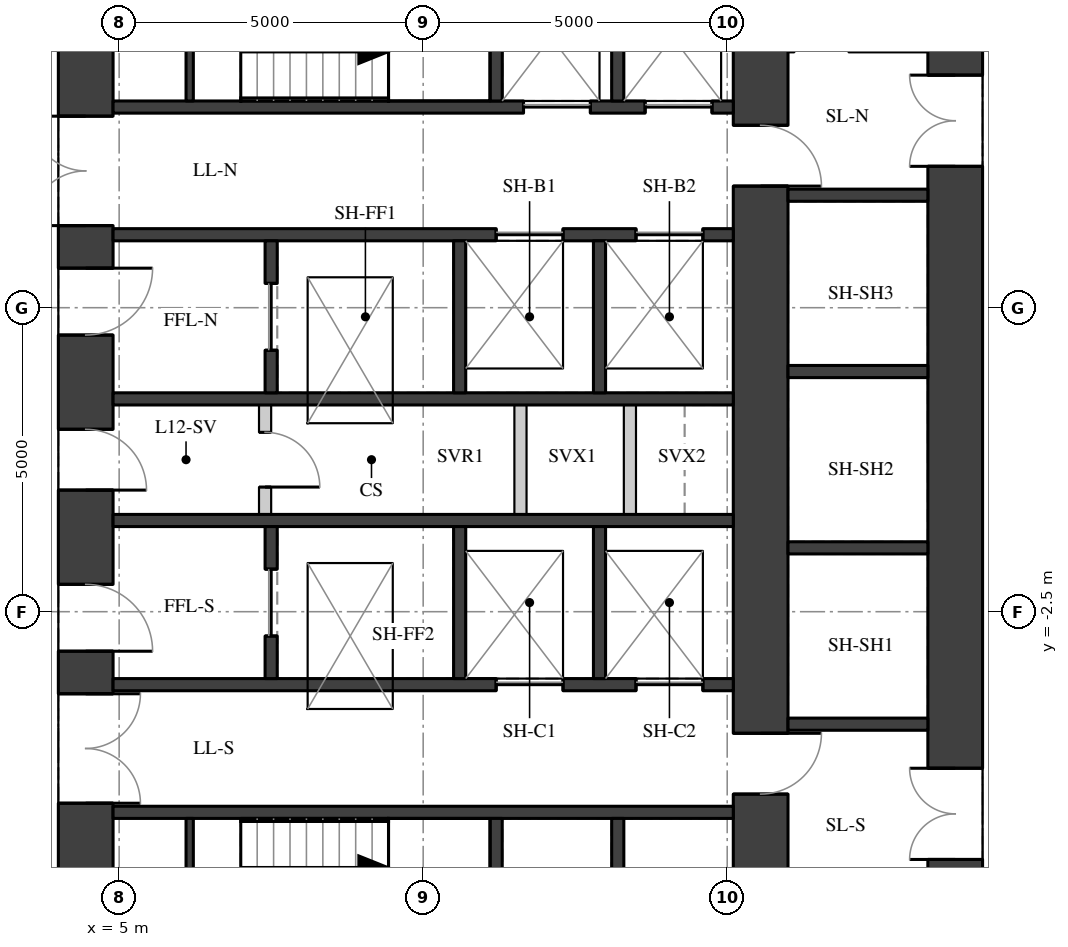
"""IFC4 building model, lengths in metres.
Left out: names, types, materials, properties, quantities, classifications, styles, units other than length and angle.
Written with IfcOpenShell. Run it as: python <this file> out.ifc"""

import sys

from ifc_helpers import new_model, si_unit, direction, frame, frame_2d, origin, place, context, subcontext, project, spatial, rectangle, extrude, element, fill, save


model = new_model("IFC4")
c1 = context("Model", 3, precision=1e-05, world=origin(), true_north=direction((0.0, 1.0)))
c2 = subcontext(c1, "Body", "Model", "MODEL_VIEW")
j1 = project(units=[si_unit("LENGTHUNIT", "METRE"), si_unit("PLANEANGLEUNIT", "RADIAN")], contexts=[c1])
p1 = place(None, origin())
s1 = spatial("IfcSite", under=j1, at=p1, CompositionType="ELEMENT")
p2 = place(p1, origin())
s2 = spatial("IfcBuilding", under=s1, at=p2, CompositionType="ELEMENT")
p3 = place(p2, frame((0.0, 0.0, 48.1)))
s3 = spatial("IfcBuildingStorey", under=s2, at=p3, CompositionType="ELEMENT", Elevation=48.1)
p4 = place(p3, frame((4.45, -11.1, 0.0), z_axis=(0.0, 0.0, 1.0), x_axis=(0.0, 1.0, 0.0)))
e1 = element("IfcWall", 1, at=p4, inside=s3, PredefinedType="SHEAR", context=c2, shape_type="SweptSolid", body=[
    extrude(rectangle(XDim=22.2, YDim=0.9, at=frame_2d((11.1, 0.0))), origin(), (0.0, 0.0, 1.0), 3.02),
])
p5 = place(p4, frame((2.35, 0.0, 0.0)))
e2 = element("IfcOpeningElement", 2, at=p5, cuts=e1, PredefinedType="OPENING", context=c2, shape_type="SweptSolid", body=[
    extrude(rectangle(XDim=1.5, YDim=2.1, at=frame_2d((0.75, 1.05))), frame((0.0, 0.46, 0.0), z_axis=(0.0, -1.0, 0.0), x_axis=(1.0, 0.0, 0.0)), (0.0, 0.0, 1.0), 0.92),
])
p6 = place(p4, frame((5.45, 0.0, 0.0)))
e3 = element("IfcOpeningElement", 3, at=p6, cuts=e1, PredefinedType="OPENING", context=c2, shape_type="SweptSolid", body=[
    extrude(rectangle(XDim=1.8, YDim=2.1, at=frame_2d((0.9, 1.05))), frame((0.0, 0.46, 0.0), z_axis=(0.0, -1.0, 0.0), x_axis=(1.0, 0.0, 0.0)), (0.0, 0.0, 1.0), 0.92),
])
p7 = place(p4, frame((7.95, 0.0, 0.0)))
e4 = element("IfcOpeningElement", 4, at=p7, cuts=e1, PredefinedType="OPENING", context=c2, shape_type="SweptSolid", body=[
    extrude(rectangle(XDim=1.1, YDim=2.1, at=frame_2d((0.55, 1.05))), frame((0.0, 0.46, 0.0), z_axis=(0.0, -1.0, 0.0), x_axis=(1.0, 0.0, 0.0)), (0.0, 0.0, 1.0), 0.92),
])
p8 = place(p4, frame((10.6, 0.0, 0.0)))
e5 = element("IfcOpeningElement", 5, at=p8, cuts=e1, PredefinedType="OPENING", context=c2, shape_type="SweptSolid", body=[
    extrude(rectangle(XDim=1.0, YDim=2.1, at=frame_2d((0.5, 1.05))), frame((0.0, 0.46, 0.0), z_axis=(0.0, -1.0, 0.0), x_axis=(1.0, 0.0, 0.0)), (0.0, 0.0, 1.0), 0.92),
])
p9 = place(p4, frame((13.15, 0.0, 0.0)))
e6 = element("IfcOpeningElement", 6, at=p9, cuts=e1, PredefinedType="OPENING", context=c2, shape_type="SweptSolid", body=[
    extrude(rectangle(XDim=1.1, YDim=2.1, at=frame_2d((0.55, 1.05))), frame((0.0, 0.46, 0.0), z_axis=(0.0, -1.0, 0.0), x_axis=(1.0, 0.0, 0.0)), (0.0, 0.0, 1.0), 0.92),
])
p10 = place(p4, frame((14.95, 0.0, 0.0)))
e7 = element("IfcOpeningElement", 7, at=p10, cuts=e1, PredefinedType="OPENING", context=c2, shape_type="SweptSolid", body=[
    extrude(rectangle(XDim=1.8, YDim=2.1, at=frame_2d((0.9, 1.05))), frame((0.0, 0.46, 0.0), z_axis=(0.0, -1.0, 0.0), x_axis=(1.0, 0.0, 0.0)), (0.0, 0.0, 1.0), 0.92),
])
p11 = place(p4, frame((18.35, 0.0, 0.0)))
e8 = element("IfcOpeningElement", 8, at=p11, cuts=e1, PredefinedType="OPENING", context=c2, shape_type="SweptSolid", body=[
    extrude(rectangle(XDim=1.5, YDim=2.1, at=frame_2d((0.75, 1.05))), frame((0.0, 0.46, 0.0), z_axis=(0.0, -1.0, 0.0), x_axis=(1.0, 0.0, 0.0)), (0.0, 0.0, 1.0), 0.92),
])
p12 = place(p3, frame((18.75, -11.1, 0.0), z_axis=(0.0, 0.0, 1.0), x_axis=(0.0, 1.0, 0.0)))
e9 = element("IfcWall", 9, at=p12, inside=s3, PredefinedType="SHEAR", context=c2, shape_type="SweptSolid", body=[
    extrude(rectangle(XDim=22.2, YDim=0.9, at=frame_2d((11.1, 0.0))), origin(), (0.0, 0.0, 1.0), 3.02),
])
p13 = place(p12, frame((15.925, 0.0, 0.0)))
e10 = element("IfcOpeningElement", 10, at=p13, cuts=e9, PredefinedType="OPENING", context=c2, shape_type="SweptSolid", body=[
    extrude(rectangle(XDim=1.5, YDim=2.1, at=frame_2d((0.75, 1.05))), frame((0.0, 0.46, 0.0), z_axis=(0.0, -1.0, 0.0), x_axis=(1.0, 0.0, 0.0)), (0.0, 0.0, 1.0), 0.92),
])
p14 = place(p12, frame((4.525, 0.0, 0.0)))
e11 = element("IfcOpeningElement", 11, at=p14, cuts=e9, PredefinedType="OPENING", context=c2, shape_type="SweptSolid", body=[
    extrude(rectangle(XDim=1.5, YDim=2.1, at=frame_2d((0.75, 1.05))), frame((0.0, 0.46, 0.0), z_axis=(0.0, -1.0, 0.0), x_axis=(1.0, 0.0, 0.0)), (0.0, 0.0, 1.0), 0.92),
])
p15 = place(p3, frame((15.55, -11.1, 0.0), z_axis=(0.0, 0.0, 1.0), x_axis=(0.0, 1.0, 0.0)))
e12 = element("IfcWall", 12, at=p15, inside=s3, PredefinedType="SHEAR", context=c2, shape_type="SweptSolid", body=[
    extrude(rectangle(XDim=22.2, YDim=0.9, at=frame_2d((11.1, 0.0))), origin(), (0.0, 0.0, 1.0), 3.02),
])
p16 = place(p15, frame((15.6, 0.0, 0.0)))
e13 = element("IfcOpeningElement", 13, at=p16, cuts=e12, PredefinedType="OPENING", context=c2, shape_type="SweptSolid", body=[
    extrude(rectangle(XDim=1.0, YDim=2.1, at=frame_2d((0.5, 1.05))), frame((0.0, 0.46, 0.0), z_axis=(0.0, -1.0, 0.0), x_axis=(1.0, 0.0, 0.0)), (0.0, 0.0, 1.0), 0.92),
])
p17 = place(p15, frame((5.6, 0.0, 0.0)))
e14 = element("IfcOpeningElement", 14, at=p17, cuts=e12, PredefinedType="OPENING", context=c2, shape_type="SweptSolid", body=[
    extrude(rectangle(XDim=1.0, YDim=2.1, at=frame_2d((0.5, 1.05))), frame((0.0, 0.46, 0.0), z_axis=(0.0, -1.0, 0.0), x_axis=(1.0, 0.0, 0.0)), (0.0, 0.0, 1.0), 0.92),
])
p18 = place(p3, frame((4.9, 5.8, 0.0), z_axis=(0.0, 0.0, 1.0), x_axis=(1.0, 0.0, 0.0)))
e15 = element("IfcWall", 15, at=p18, inside=s3, PredefinedType="SHEAR", context=c2, shape_type="SweptSolid", body=[
    extrude(rectangle(XDim=10.2, YDim=0.2, at=frame_2d((5.1, 0.0))), origin(), (0.0, 0.0, 1.0), 3.02),
])
p19 = place(p18, frame((6.75, 0.0, 0.0)))
e16 = element("IfcOpeningElement", 16, at=p19, cuts=e15, PredefinedType="OPENING", context=c2, shape_type="SweptSolid", body=[
    extrude(rectangle(XDim=1.1, YDim=2.1, at=frame_2d((0.55, 1.05))), frame((0.0, 0.11, 0.0), z_axis=(0.0, -1.0, 0.0), x_axis=(1.0, 0.0, 0.0)), (0.0, 0.0, 1.0), 0.22),
])
p20 = place(p18, frame((8.75, 0.0, 0.0)))
e17 = element("IfcOpeningElement", 17, at=p20, cuts=e15, PredefinedType="OPENING", context=c2, shape_type="SweptSolid", body=[
    extrude(rectangle(XDim=1.1, YDim=2.1, at=frame_2d((0.55, 1.05))), frame((0.0, 0.11, 0.0), z_axis=(0.0, -1.0, 0.0), x_axis=(1.0, 0.0, 0.0)), (0.0, 0.0, 1.0), 0.22),
])
p21 = place(p3, frame((4.9, 3.7, 0.0), z_axis=(0.0, 0.0, 1.0), x_axis=(1.0, 0.0, 0.0)))
e18 = element("IfcWall", 18, at=p21, inside=s3, PredefinedType="SHEAR", context=c2, shape_type="SweptSolid", body=[
    extrude(rectangle(XDim=10.2, YDim=0.2, at=frame_2d((5.1, 0.0))), origin(), (0.0, 0.0, 1.0), 3.02),
])
p22 = place(p21, frame((6.3, 0.0, 0.0)))
e19 = element("IfcOpeningElement", 19, at=p22, cuts=e18, PredefinedType="OPENING", context=c2, shape_type="SweptSolid", body=[
    extrude(rectangle(XDim=1.1, YDim=2.1, at=frame_2d((0.55, 1.05))), frame((0.0, 0.11, 0.0), z_axis=(0.0, -1.0, 0.0), x_axis=(1.0, 0.0, 0.0)), (0.0, 0.0, 1.0), 0.22),
])
p23 = place(p21, frame((8.6, 0.0, 0.0)))
e20 = element("IfcOpeningElement", 20, at=p23, cuts=e18, PredefinedType="OPENING", context=c2, shape_type="SweptSolid", body=[
    extrude(rectangle(XDim=1.1, YDim=2.1, at=frame_2d((0.55, 1.05))), frame((0.0, 0.11, 0.0), z_axis=(0.0, -1.0, 0.0), x_axis=(1.0, 0.0, 0.0)), (0.0, 0.0, 1.0), 0.22),
])
for number, where, z_axis, x_axis in (
    (21, (4.9, 1.0, 0.0), (0.0, 0.0, 1.0), (1.0, 0.0, 0.0)),
    (22, (4.9, -1.0, 0.0), (0.0, 0.0, 1.0), (1.0, 0.0, 0.0)),
):
    element("IfcWall", number, at=place(p3, frame(where, z_axis=z_axis, x_axis=x_axis)), inside=s3, PredefinedType="SHEAR", context=c2, shape_type="SweptSolid", body=[
        extrude(rectangle(XDim=10.2, YDim=0.2, at=frame_2d((5.1, 0.0))), origin(), (0.0, 0.0, 1.0), 3.02),
    ])
p24 = place(p3, frame((4.9, -3.7, 0.0), z_axis=(0.0, 0.0, 1.0), x_axis=(1.0, 0.0, 0.0)))
e23 = element("IfcWall", 23, at=p24, inside=s3, PredefinedType="SHEAR", context=c2, shape_type="SweptSolid", body=[
    extrude(rectangle(XDim=10.2, YDim=0.2, at=frame_2d((5.1, 0.0))), origin(), (0.0, 0.0, 1.0), 3.02),
])
p25 = place(p24, frame((6.3, 0.0, 0.0)))
e24 = element("IfcOpeningElement", 24, at=p25, cuts=e23, PredefinedType="OPENING", context=c2, shape_type="SweptSolid", body=[
    extrude(rectangle(XDim=1.1, YDim=2.1, at=frame_2d((0.55, 1.05))), frame((0.0, 0.11, 0.0), z_axis=(0.0, -1.0, 0.0), x_axis=(1.0, 0.0, 0.0)), (0.0, 0.0, 1.0), 0.22),
])
p26 = place(p24, frame((8.6, 0.0, 0.0)))
e25 = element("IfcOpeningElement", 25, at=p26, cuts=e23, PredefinedType="OPENING", context=c2, shape_type="SweptSolid", body=[
    extrude(rectangle(XDim=1.1, YDim=2.1, at=frame_2d((0.55, 1.05))), frame((0.0, 0.11, 0.0), z_axis=(0.0, -1.0, 0.0), x_axis=(1.0, 0.0, 0.0)), (0.0, 0.0, 1.0), 0.22),
])
p27 = place(p3, frame((4.9, -5.8, 0.0), z_axis=(0.0, 0.0, 1.0), x_axis=(1.0, 0.0, 0.0)))
e26 = element("IfcWall", 26, at=p27, inside=s3, PredefinedType="SHEAR", context=c2, shape_type="SweptSolid", body=[
    extrude(rectangle(XDim=10.2, YDim=0.2, at=frame_2d((5.1, 0.0))), origin(), (0.0, 0.0, 1.0), 3.02),
])
for number, where, z_axis, x_axis in (
    (27, (11.2, 5.9, 0.0), (0.0, 0.0, 1.0), (0.0, 1.0, 0.0)),
    (28, (11.2, -9.1, 0.0), (0.0, 0.0, 1.0), (0.0, 1.0, 0.0)),
    (29, (13.2, 5.9, 0.0), (0.0, 0.0, 1.0), (0.0, 1.0, 0.0)),
    (30, (13.2, -9.1, 0.0), (0.0, 0.0, 1.0), (0.0, 1.0, 0.0)),
):
    element("IfcWall", number, at=place(p3, frame(where, z_axis=z_axis, x_axis=x_axis)), inside=s3, PredefinedType="SHEAR", context=c2, shape_type="SweptSolid", body=[
        extrude(rectangle(XDim=3.2, YDim=0.2, at=frame_2d((1.6, 0.0))), origin(), (0.0, 0.0, 1.0), 3.02),
    ])
p28 = place(p3, frame((7.5, 1.1, 0.0), z_axis=(0.0, 0.0, 1.0), x_axis=(0.0, 1.0, 0.0)))
e31 = element("IfcWall", 31, at=p28, inside=s3, PredefinedType="SHEAR", context=c2, shape_type="SweptSolid", body=[
    extrude(rectangle(XDim=2.5, YDim=0.2, at=frame_2d((1.25, 0.0))), origin(), (0.0, 0.0, 1.0), 3.02),
])
p29 = place(p28, frame((0.7, 0.0, 0.0)))
e32 = element("IfcOpeningElement", 32, at=p29, cuts=e31, PredefinedType="OPENING", context=c2, shape_type="SweptSolid", body=[
    extrude(rectangle(XDim=1.1, YDim=2.1, at=frame_2d((0.55, 1.05))), frame((0.0, 0.11, 0.0), z_axis=(0.0, -1.0, 0.0), x_axis=(1.0, 0.0, 0.0)), (0.0, 0.0, 1.0), 0.22),
])
p30 = place(p3, frame((7.5, -3.6, 0.0), z_axis=(0.0, 0.0, 1.0), x_axis=(0.0, 1.0, 0.0)))
e33 = element("IfcWall", 33, at=p30, inside=s3, PredefinedType="SHEAR", context=c2, shape_type="SweptSolid", body=[
    extrude(rectangle(XDim=2.5, YDim=0.2, at=frame_2d((1.25, 0.0))), origin(), (0.0, 0.0, 1.0), 3.02),
])
p31 = place(p30, frame((0.7, 0.0, 0.0)))
e34 = element("IfcOpeningElement", 34, at=p31, cuts=e33, PredefinedType="OPENING", context=c2, shape_type="SweptSolid", body=[
    extrude(rectangle(XDim=1.1, YDim=2.1, at=frame_2d((0.55, 1.05))), frame((0.0, 0.11, 0.0), z_axis=(0.0, -1.0, 0.0), x_axis=(1.0, 0.0, 0.0)), (0.0, 0.0, 1.0), 0.22),
])
for number, where, z_axis, x_axis in (
    (35, (10.6, 1.1, 0.0), (0.0, 0.0, 1.0), (0.0, 1.0, 0.0)),
    (36, (10.6, -3.6, 0.0), (0.0, 0.0, 1.0), (0.0, 1.0, 0.0)),
    (37, (12.9, 1.1, 0.0), (0.0, 0.0, 1.0), (0.0, 1.0, 0.0)),
    (38, (12.9, -3.6, 0.0), (0.0, 0.0, 1.0), (0.0, 1.0, 0.0)),
):
    element("IfcWall", number, at=place(p3, frame(where, z_axis=z_axis, x_axis=x_axis)), inside=s3, PredefinedType="SHEAR", context=c2, shape_type="SweptSolid", body=[
        extrude(rectangle(XDim=2.5, YDim=0.2, at=frame_2d((1.25, 0.0))), origin(), (0.0, 0.0, 1.0), 3.02),
    ])
p32 = place(p3, frame((6.16, 5.9, 0.0), z_axis=(0.0, 0.0, 1.0), x_axis=(0.0, 1.0, 0.0)))
e39 = element("IfcWall", 39, at=p32, inside=s3, PredefinedType="SHEAR", context=c2, shape_type="SweptSolid", body=[
    extrude(rectangle(XDim=3.2, YDim=0.12, at=frame_2d((1.6, 0.0))), origin(), (0.0, 0.0, 1.0), 3.02),
])
p33 = place(p32, frame((0.85, 0.0, 0.0)))
e40 = element("IfcOpeningElement", 40, at=p33, cuts=e39, PredefinedType="OPENING", context=c2, shape_type="SweptSolid", body=[
    extrude(rectangle(XDim=1.5, YDim=2.1, at=frame_2d((0.75, 1.05))), frame((0.0, 0.07, 0.0), z_axis=(0.0, -1.0, 0.0), x_axis=(1.0, 0.0, 0.0)), (0.0, 0.0, 1.0), 0.14),
])
p34 = place(p3, frame((6.16, -9.1, 0.0), z_axis=(0.0, 0.0, 1.0), x_axis=(0.0, 1.0, 0.0)))
e41 = element("IfcWall", 41, at=p34, inside=s3, PredefinedType="SHEAR", context=c2, shape_type="SweptSolid", body=[
    extrude(rectangle(XDim=3.2, YDim=0.12, at=frame_2d((1.6, 0.0))), origin(), (0.0, 0.0, 1.0), 3.02),
])
p35 = place(p34, frame((0.85, 0.0, 0.0)))
e42 = element("IfcOpeningElement", 42, at=p35, cuts=e41, PredefinedType="OPENING", context=c2, shape_type="SweptSolid", body=[
    extrude(rectangle(XDim=1.5, YDim=2.1, at=frame_2d((0.75, 1.05))), frame((0.0, 0.07, 0.0), z_axis=(0.0, -1.0, 0.0), x_axis=(1.0, 0.0, 0.0)), (0.0, 0.0, 1.0), 0.14),
])
p36 = place(p3, frame((7.4, -0.9, 0.0), z_axis=(0.0, 0.0, 1.0), x_axis=(0.0, 1.0, 0.0)))
e43 = element("IfcWall", 43, at=p36, inside=s3, PredefinedType="PARTITIONING", context=c2, shape_type="SweptSolid", body=[
    extrude(rectangle(XDim=1.8, YDim=0.2, at=frame_2d((0.9, 0.0))), origin(), (0.0, 0.0, 1.0), 3.02),
])
p37 = place(p36, frame((0.45, 0.0, 0.0)))
e44 = element("IfcOpeningElement", 44, at=p37, cuts=e43, PredefinedType="OPENING", context=c2, shape_type="SweptSolid", body=[
    extrude(rectangle(XDim=0.9, YDim=2.1, at=frame_2d((0.45, 1.05))), frame((0.0, 0.11, 0.0), z_axis=(0.0, -1.0, 0.0), x_axis=(1.0, 0.0, 0.0)), (0.0, 0.0, 1.0), 0.22),
])
for number, where, z_axis, x_axis in (
    (45, (11.6, -0.9, 0.0), (0.0, 0.0, 1.0), (0.0, 1.0, 0.0)),
    (46, (13.4, -0.9, 0.0), (0.0, 0.0, 1.0), (0.0, 1.0, 0.0)),
):
    element("IfcWall", number, at=place(p3, frame(where, z_axis=z_axis, x_axis=x_axis)), inside=s3, PredefinedType="PARTITIONING", context=c2, shape_type="SweptSolid", body=[
        extrude(rectangle(XDim=1.8, YDim=0.2, at=frame_2d((0.9, 0.0))), origin(), (0.0, 0.0, 1.0), 3.02),
    ])
for number, where, z_axis, x_axis in (
    (47, (16.0, -4.35, 0.0), (0.0, 0.0, 1.0), (1.0, 0.0, 0.0)),
    (48, (16.0, -1.45, 0.0), (0.0, 0.0, 1.0), (1.0, 0.0, 0.0)),
    (49, (16.0, 1.45, 0.0), (0.0, 0.0, 1.0), (1.0, 0.0, 0.0)),
    (50, (16.0, 4.35, 0.0), (0.0, 0.0, 1.0), (1.0, 0.0, 0.0)),
):
    element("IfcWall", number, at=place(p3, frame(where, z_axis=z_axis, x_axis=x_axis)), inside=s3, PredefinedType="SHEAR", context=c2, shape_type="SweptSolid", body=[
        extrude(rectangle(XDim=2.3, YDim=0.2, at=frame_2d((1.15, 0.0))), origin(), (0.0, 0.0, 1.0), 3.02),
    ])
p38 = place(p6, origin())
e51 = element("IfcDoor", 51, at=p38, inside=s3, OperationType="DOUBLE_DOOR_SINGLE_SWING", PredefinedType="DOOR", context=c2, shape_type="SweptSolid", body=[
    extrude(rectangle(XDim=1.8, YDim=2.1, at=frame_2d((0.9, 1.05))), frame((0.0, 0.025, 0.0), z_axis=(0.0, -1.0, 0.0), x_axis=(1.0, 0.0, 0.0)), (0.0, 0.0, 1.0), 0.05),
])
fill(e3, e51)
p39 = place(p7, origin())
e52 = element("IfcDoor", 52, at=p39, inside=s3, OperationType="SINGLE_SWING_RIGHT", PredefinedType="DOOR", context=c2, shape_type="SweptSolid", body=[
    extrude(rectangle(XDim=1.1, YDim=2.1, at=frame_2d((0.55, 1.05))), frame((0.0, 0.025, 0.0), z_axis=(0.0, -1.0, 0.0), x_axis=(1.0, 0.0, 0.0)), (0.0, 0.0, 1.0), 0.05),
])
fill(e4, e52)
p40 = place(p8, origin())
e53 = element("IfcDoor", 53, at=p40, inside=s3, OperationType="SINGLE_SWING_RIGHT", PredefinedType="DOOR", context=c2, shape_type="SweptSolid", body=[
    extrude(rectangle(XDim=1.0, YDim=2.1, at=frame_2d((0.5, 1.05))), frame((0.0, 0.025, 0.0), z_axis=(0.0, -1.0, 0.0), x_axis=(1.0, 0.0, 0.0)), (0.0, 0.0, 1.0), 0.05),
])
fill(e5, e53)
p41 = place(p9, origin())
e54 = element("IfcDoor", 54, at=p41, inside=s3, OperationType="SINGLE_SWING_LEFT", PredefinedType="DOOR", context=c2, shape_type="SweptSolid", body=[
    extrude(rectangle(XDim=1.1, YDim=2.1, at=frame_2d((0.55, 1.05))), frame((0.0, 0.025, 0.0), z_axis=(0.0, -1.0, 0.0), x_axis=(1.0, 0.0, 0.0)), (0.0, 0.0, 1.0), 0.05),
])
fill(e6, e54)
p42 = place(p10, origin())
e55 = element("IfcDoor", 55, at=p42, inside=s3, OperationType="DOUBLE_DOOR_SINGLE_SWING", PredefinedType="DOOR", context=c2, shape_type="SweptSolid", body=[
    extrude(rectangle(XDim=1.8, YDim=2.1, at=frame_2d((0.9, 1.05))), frame((0.0, 0.025, 0.0), z_axis=(0.0, -1.0, 0.0), x_axis=(1.0, 0.0, 0.0)), (0.0, 0.0, 1.0), 0.05),
])
fill(e7, e55)
p43 = place(p13, origin())
e56 = element("IfcDoor", 56, at=p43, inside=s3, OperationType="DOUBLE_DOOR_SINGLE_SWING", PredefinedType="DOOR", context=c2, shape_type="SweptSolid", body=[
    extrude(rectangle(XDim=1.5, YDim=2.1, at=frame_2d((0.75, 1.05))), frame((0.0, 0.025, 0.0), z_axis=(0.0, -1.0, 0.0), x_axis=(1.0, 0.0, 0.0)), (0.0, 0.0, 1.0), 0.05),
])
fill(e10, e56)
p44 = place(p14, origin())
e57 = element("IfcDoor", 57, at=p44, inside=s3, OperationType="DOUBLE_DOOR_SINGLE_SWING", PredefinedType="DOOR", context=c2, shape_type="SweptSolid", body=[
    extrude(rectangle(XDim=1.5, YDim=2.1, at=frame_2d((0.75, 1.05))), frame((0.0, 0.025, 0.0), z_axis=(0.0, -1.0, 0.0), x_axis=(1.0, 0.0, 0.0)), (0.0, 0.0, 1.0), 0.05),
])
fill(e11, e57)
p45 = place(p19, origin())
e58 = element("IfcDoor", 58, at=p45, inside=s3, OperationType="DOUBLE_DOOR_SLIDING", PredefinedType="DOOR", context=c2, shape_type="SweptSolid", body=[
    extrude(rectangle(XDim=1.1, YDim=2.1, at=frame_2d((0.55, 1.05))), frame((0.0, 0.025, 0.0), z_axis=(0.0, -1.0, 0.0), x_axis=(1.0, 0.0, 0.0)), (0.0, 0.0, 1.0), 0.05),
])
fill(e16, e58)
p46 = place(p20, origin())
e59 = element("IfcDoor", 59, at=p46, inside=s3, OperationType="DOUBLE_DOOR_SLIDING", PredefinedType="DOOR", context=c2, shape_type="SweptSolid", body=[
    extrude(rectangle(XDim=1.1, YDim=2.1, at=frame_2d((0.55, 1.05))), frame((0.0, 0.025, 0.0), z_axis=(0.0, -1.0, 0.0), x_axis=(1.0, 0.0, 0.0)), (0.0, 0.0, 1.0), 0.05),
])
fill(e17, e59)
p47 = place(p22, origin())
e60 = element("IfcDoor", 60, at=p47, inside=s3, OperationType="DOUBLE_DOOR_SLIDING", PredefinedType="DOOR", context=c2, shape_type="SweptSolid", body=[
    extrude(rectangle(XDim=1.1, YDim=2.1, at=frame_2d((0.55, 1.05))), frame((0.0, 0.025, 0.0), z_axis=(0.0, -1.0, 0.0), x_axis=(1.0, 0.0, 0.0)), (0.0, 0.0, 1.0), 0.05),
])
fill(e19, e60)
p48 = place(p23, origin())
e61 = element("IfcDoor", 61, at=p48, inside=s3, OperationType="DOUBLE_DOOR_SLIDING", PredefinedType="DOOR", context=c2, shape_type="SweptSolid", body=[
    extrude(rectangle(XDim=1.1, YDim=2.1, at=frame_2d((0.55, 1.05))), frame((0.0, 0.025, 0.0), z_axis=(0.0, -1.0, 0.0), x_axis=(1.0, 0.0, 0.0)), (0.0, 0.0, 1.0), 0.05),
])
fill(e20, e61)
p49 = place(p25, origin())
e62 = element("IfcDoor", 62, at=p49, inside=s3, OperationType="DOUBLE_DOOR_SLIDING", PredefinedType="DOOR", context=c2, shape_type="SweptSolid", body=[
    extrude(rectangle(XDim=1.1, YDim=2.1, at=frame_2d((0.55, 1.05))), frame((0.0, 0.025, 0.0), z_axis=(0.0, -1.0, 0.0), x_axis=(1.0, 0.0, 0.0)), (0.0, 0.0, 1.0), 0.05),
])
fill(e24, e62)
p50 = place(p26, origin())
e63 = element("IfcDoor", 63, at=p50, inside=s3, OperationType="DOUBLE_DOOR_SLIDING", PredefinedType="DOOR", context=c2, shape_type="SweptSolid", body=[
    extrude(rectangle(XDim=1.1, YDim=2.1, at=frame_2d((0.55, 1.05))), frame((0.0, 0.025, 0.0), z_axis=(0.0, -1.0, 0.0), x_axis=(1.0, 0.0, 0.0)), (0.0, 0.0, 1.0), 0.05),
])
fill(e25, e63)
p51 = place(p29, origin())
e64 = element("IfcDoor", 64, at=p51, inside=s3, OperationType="DOUBLE_DOOR_SLIDING", PredefinedType="DOOR", context=c2, shape_type="SweptSolid", body=[
    extrude(rectangle(XDim=1.1, YDim=2.1, at=frame_2d((0.55, 1.05))), frame((0.0, 0.025, 0.0), z_axis=(0.0, -1.0, 0.0), x_axis=(1.0, 0.0, 0.0)), (0.0, 0.0, 1.0), 0.05),
])
fill(e32, e64)
p52 = place(p31, origin())
e65 = element("IfcDoor", 65, at=p52, inside=s3, OperationType="DOUBLE_DOOR_SLIDING", PredefinedType="DOOR", context=c2, shape_type="SweptSolid", body=[
    extrude(rectangle(XDim=1.1, YDim=2.1, at=frame_2d((0.55, 1.05))), frame((0.0, 0.025, 0.0), z_axis=(0.0, -1.0, 0.0), x_axis=(1.0, 0.0, 0.0)), (0.0, 0.0, 1.0), 0.05),
])
fill(e34, e65)
p53 = place(p37, origin())
e66 = element("IfcDoor", 66, at=p53, inside=s3, OperationType="SINGLE_SWING_RIGHT", PredefinedType="DOOR", context=c2, shape_type="SweptSolid", body=[
    extrude(rectangle(XDim=0.9, YDim=2.1, at=frame_2d((0.45, 1.05))), frame((0.0, 0.025, 0.0), z_axis=(0.0, -1.0, 0.0), x_axis=(1.0, 0.0, 0.0)), (0.0, 0.0, 1.0), 0.05),
])
fill(e44, e66)
p54 = place(p16, origin())
e67 = element("IfcDoor", 67, at=p54, inside=s3, OperationType="SINGLE_SWING_RIGHT", PredefinedType="DOOR", context=c2, shape_type="SweptSolid", body=[
    extrude(rectangle(XDim=1.0, YDim=2.1, at=frame_2d((0.5, 1.05))), frame((0.0, 0.025, 0.0), z_axis=(0.0, -1.0, 0.0), x_axis=(1.0, 0.0, 0.0)), (0.0, 0.0, 1.0), 0.05),
])
fill(e13, e67)
p55 = place(p17, origin())
e68 = element("IfcDoor", 68, at=p55, inside=s3, OperationType="SINGLE_SWING_LEFT", PredefinedType="DOOR", context=c2, shape_type="SweptSolid", body=[
    extrude(rectangle(XDim=1.0, YDim=2.1, at=frame_2d((0.5, 1.05))), frame((0.0, 0.025, 0.0), z_axis=(0.0, -1.0, 0.0), x_axis=(1.0, 0.0, 0.0)), (0.0, 0.0, 1.0), 0.05),
])
fill(e14, e68)
save(model, sys.argv[1])
